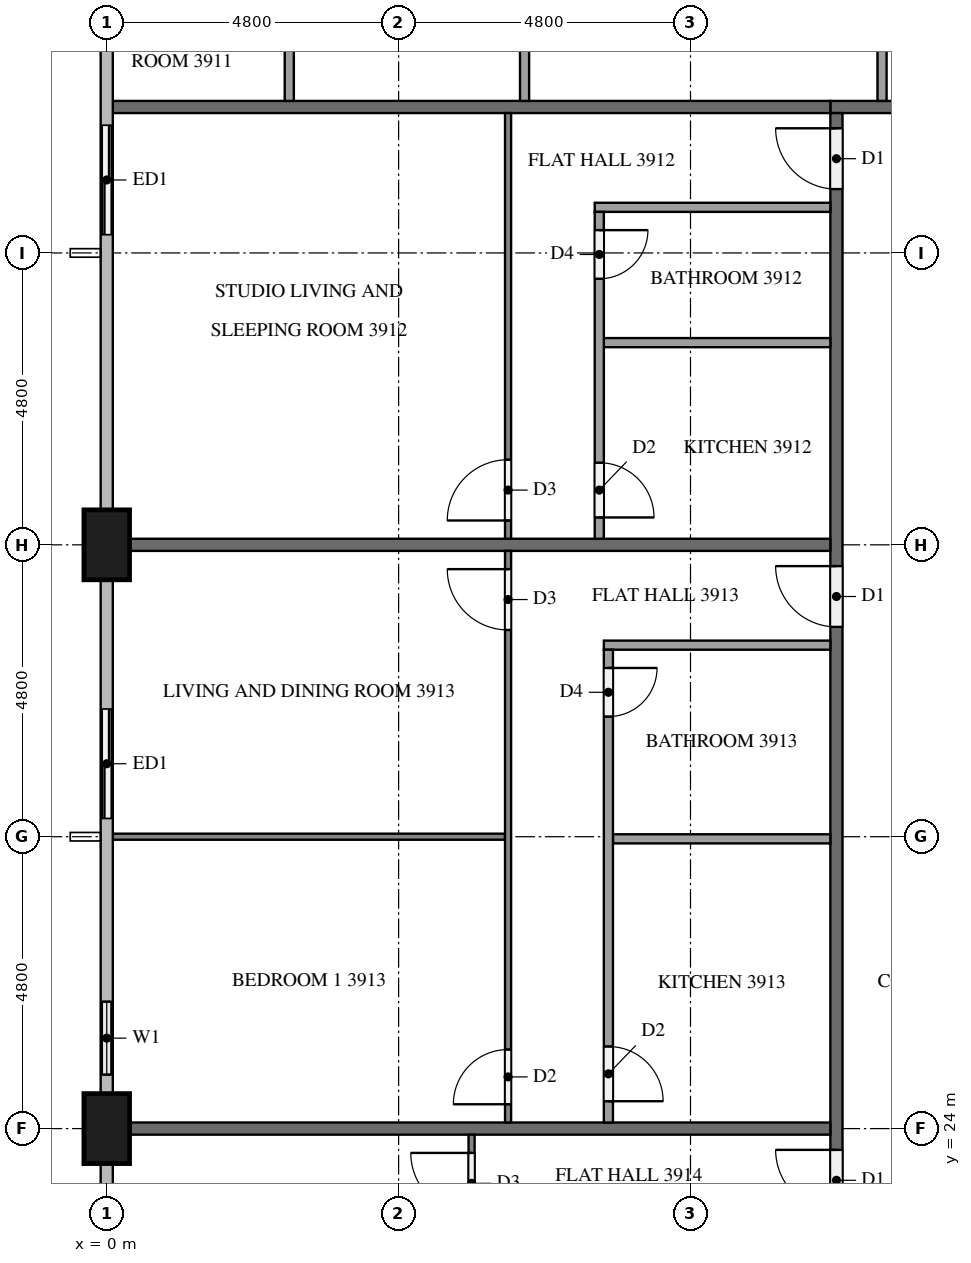
"""IFC4 building model, lengths in metres.
Left out: names, types, materials, properties, quantities, classifications, styles, units other than length and angle.
Written with IfcOpenShell. Run it as: python <this file> out.ifc"""

import sys

from ifc_helpers import new_model, si_unit, direction, frame, frame_2d, origin, origin_2d, place, context, subcontext, project, spatial, rectangle, extrude, element, fill, save


model = new_model("IFC4")
c1 = context("Model", 3, precision=1e-05, world=origin(), true_north=direction((0.0, 1.0)))
c2 = subcontext(c1, "Body", "Model", "MODEL_VIEW")
j1 = project(units=[si_unit("LENGTHUNIT", "METRE"), si_unit("PLANEANGLEUNIT", "RADIAN")], contexts=[c1])
p1 = place(None, origin())
s1 = spatial("IfcSite", under=j1, at=p1, CompositionType="ELEMENT")
p2 = place(p1, origin())
s2 = spatial("IfcBuilding", under=s1, at=p2, CompositionType="ELEMENT")
p3 = place(p2, frame((0.0, 0.0, 152.5)))
s3 = spatial("IfcBuildingStorey", under=s2, at=p3, CompositionType="ELEMENT", Elevation=152.5)
for number, where, z_axis, x_axis in (
    (1, (0.0, 33.6, 0.0), (0.0, 0.0, 1.0), (0.0, 1.0, 0.0)),
    (2, (0.0, 24.0, 0.0), (0.0, 0.0, 1.0), (0.0, 1.0, 0.0)),
):
    element("IfcColumn", number, at=place(p3, frame(where, z_axis=z_axis, x_axis=x_axis)), inside=s3, PredefinedType="COLUMN", context=c2, shape_type="SweptSolid", body=[
        extrude(rectangle(XDim=1.15, YDim=0.75, at=origin_2d()), origin(), (0.0, 0.0, 1.0), 3.2),
    ])
p4 = place(p3, frame((0.0, 40.8, 0.0), z_axis=(0.0, 0.0, 1.0), x_axis=(0.0, -1.0, 0.0)))
e3 = element("IfcWall", 3, at=p4, inside=s3, PredefinedType="SOLIDWALL", context=c2, shape_type="SweptSolid", body=[
    extrude(rectangle(XDim=2.4, YDim=0.15, at=frame_2d((1.2, 0.0))), origin(), (0.0, 0.0, 1.0), 3.2),
])
p5 = place(p4, frame((0.3, 0.0, 0.0)))
e4 = element("IfcOpeningElement", 4, at=p5, cuts=e3, PredefinedType="OPENING", context=c2, shape_type="SweptSolid", body=[
    extrude(rectangle(XDim=1.8, YDim=2.4, at=frame_2d((0.9, 1.2))), frame((0.0, 0.085, 0.0), z_axis=(0.0, -1.0, 0.0), x_axis=(1.0, 0.0, 0.0)), (0.0, 0.0, 1.0), 0.17),
])
p6 = place(p3, frame((0.0, 31.2, 0.0), z_axis=(0.0, 0.0, 1.0), x_axis=(0.0, -1.0, 0.0)))
e5 = element("IfcWall", 5, at=p6, inside=s3, PredefinedType="SOLIDWALL", context=c2, shape_type="SweptSolid", body=[
    extrude(rectangle(XDim=2.4, YDim=0.15, at=frame_2d((1.2, 0.0))), origin(), (0.0, 0.0, 1.0), 3.2),
])
p7 = place(p6, frame((0.3, 0.0, 0.0)))
e6 = element("IfcOpeningElement", 6, at=p7, cuts=e5, PredefinedType="OPENING", context=c2, shape_type="SweptSolid", body=[
    extrude(rectangle(XDim=1.8, YDim=2.4, at=frame_2d((0.9, 1.2))), frame((0.0, 0.085, 0.0), z_axis=(0.0, -1.0, 0.0), x_axis=(1.0, 0.0, 0.0)), (0.0, 0.0, 1.0), 0.17),
])
p8 = place(p3, frame((0.0, 26.4, 0.0), z_axis=(0.0, 0.0, 1.0), x_axis=(0.0, -1.0, 0.0)))
e7 = element("IfcWall", 7, at=p8, inside=s3, PredefinedType="SOLIDWALL", context=c2, shape_type="SweptSolid", body=[
    extrude(rectangle(XDim=1.825, YDim=0.15, at=frame_2d((0.913, 0.0))), origin(), (0.0, 0.0, 1.0), 3.2),
])
p9 = place(p8, frame((0.312, 0.0, 0.9)))
e8 = element("IfcOpeningElement", 8, at=p9, cuts=e7, PredefinedType="OPENING", context=c2, shape_type="SweptSolid", body=[
    extrude(rectangle(XDim=1.2, YDim=1.4, at=frame_2d((0.6, 0.7))), frame((0.0, 0.085, 0.0), z_axis=(0.0, -1.0, 0.0), x_axis=(1.0, 0.0, 0.0)), (0.0, 0.0, 1.0), 0.17),
])
p10 = place(p3, frame((11.9, 40.8, 0.0), z_axis=(0.0, 0.0, 1.0), x_axis=(1.0, 0.0, 0.0)))
e9 = element("IfcWall", 9, at=p10, inside=s3, PredefinedType="PARTITIONING", context=c2, shape_type="SweptSolid", body=[
    extrude(rectangle(XDim=38.6, YDim=0.2, at=frame_2d((19.3, 0.0))), origin(), (0.0, 0.0, 1.0), 3.2),
])
p11 = place(p10, frame((31.65, 0.0, 0.0)))
e10 = element("IfcOpeningElement", 10, at=p11, cuts=e9, PredefinedType="OPENING", context=c2, shape_type="SweptSolid", body=[
    extrude(rectangle(XDim=1.0, YDim=2.1, at=frame_2d((0.5, 1.05))), frame((0.0, 0.11, 0.0), z_axis=(0.0, -1.0, 0.0), x_axis=(1.0, 0.0, 0.0)), (0.0, 0.0, 1.0), 0.22),
])
p12 = place(p10, frame((29.95, 0.0, 0.0)))
e11 = element("IfcOpeningElement", 11, at=p12, cuts=e9, PredefinedType="OPENING", context=c2, shape_type="SweptSolid", body=[
    extrude(rectangle(XDim=1.0, YDim=2.1, at=frame_2d((0.5, 1.05))), frame((0.0, 0.11, 0.0), z_axis=(0.0, -1.0, 0.0), x_axis=(1.0, 0.0, 0.0)), (0.0, 0.0, 1.0), 0.22),
])
p13 = place(p10, frame((15.55, 0.0, 0.0)))
e12 = element("IfcOpeningElement", 12, at=p13, cuts=e9, PredefinedType="OPENING", context=c2, shape_type="SweptSolid", body=[
    extrude(rectangle(XDim=1.0, YDim=2.1, at=frame_2d((0.5, 1.05))), frame((0.0, 0.11, 0.0), z_axis=(0.0, -1.0, 0.0), x_axis=(1.0, 0.0, 0.0)), (0.0, 0.0, 1.0), 0.22),
])
p14 = place(p10, frame((1.15, 0.0, 0.0)))
e13 = element("IfcOpeningElement", 13, at=p14, cuts=e9, PredefinedType="OPENING", context=c2, shape_type="SweptSolid", body=[
    extrude(rectangle(XDim=1.0, YDim=2.1, at=frame_2d((0.5, 1.05))), frame((0.0, 0.11, 0.0), z_axis=(0.0, -1.0, 0.0), x_axis=(1.0, 0.0, 0.0)), (0.0, 0.0, 1.0), 0.22),
])
p15 = place(p3, frame((12.0, 12.1, 0.0), z_axis=(0.0, 0.0, 1.0), x_axis=(0.0, 1.0, 0.0)))
e14 = element("IfcWall", 14, at=p15, inside=s3, PredefinedType="PARTITIONING", context=c2, shape_type="SweptSolid", body=[
    extrude(rectangle(XDim=28.6, YDim=0.2, at=frame_2d((14.3, 0.0))), origin(), (0.0, 0.0, 1.0), 3.2),
])
p16 = place(p15, frame((27.35, 0.0, 0.0)))
e15 = element("IfcOpeningElement", 15, at=p16, cuts=e14, PredefinedType="OPENING", context=c2, shape_type="SweptSolid", body=[
    extrude(rectangle(XDim=1.0, YDim=2.1, at=frame_2d((0.5, 1.05))), frame((0.0, 0.11, 0.0), z_axis=(0.0, -1.0, 0.0), x_axis=(1.0, 0.0, 0.0)), (0.0, 0.0, 1.0), 0.22),
])
p17 = place(p15, frame((20.15, 0.0, 0.0)))
e16 = element("IfcOpeningElement", 16, at=p17, cuts=e14, PredefinedType="OPENING", context=c2, shape_type="SweptSolid", body=[
    extrude(rectangle(XDim=1.0, YDim=2.1, at=frame_2d((0.5, 1.05))), frame((0.0, 0.11, 0.0), z_axis=(0.0, -1.0, 0.0), x_axis=(1.0, 0.0, 0.0)), (0.0, 0.0, 1.0), 0.22),
])
p18 = place(p15, frame((10.55, 0.0, 0.0)))
e17 = element("IfcOpeningElement", 17, at=p18, cuts=e14, PredefinedType="OPENING", context=c2, shape_type="SweptSolid", body=[
    extrude(rectangle(XDim=1.0, YDim=2.1, at=frame_2d((0.5, 1.05))), frame((0.0, 0.11, 0.0), z_axis=(0.0, -1.0, 0.0), x_axis=(1.0, 0.0, 0.0)), (0.0, 0.0, 1.0), 0.22),
])
p19 = place(p3, frame((0.1, 40.8, 0.0), z_axis=(0.0, 0.0, 1.0), x_axis=(1.0, 0.0, 0.0)))
e18 = element("IfcWall", 18, at=p19, inside=s3, PredefinedType="PARTITIONING", context=c2, shape_type="SweptSolid", body=[
    extrude(rectangle(XDim=11.8, YDim=0.2, at=frame_2d((5.9, 0.0))), origin(), (0.0, 0.0, 1.0), 3.2),
])
for number, where, z_axis, x_axis in (
    (19, (0.375, 33.6, 0.0), (0.0, 0.0, 1.0), (1.0, 0.0, 0.0)),
    (20, (0.375, 24.0, 0.0), (0.0, 0.0, 1.0), (1.0, 0.0, 0.0)),
):
    element("IfcWall", number, at=place(p3, frame(where, z_axis=z_axis, x_axis=x_axis)), inside=s3, PredefinedType="PARTITIONING", context=c2, shape_type="SweptSolid", body=[
        extrude(rectangle(XDim=11.525, YDim=0.2, at=frame_2d((5.762, 0.0))), origin(), (0.0, 0.0, 1.0), 3.2),
    ])
for number, where, z_axis, x_axis in (
    (21, (6.871, 40.9, 0.0), (0.0, 0.0, 1.0), (0.0, 1.0, 0.0)),
    (22, (3.002, 40.9, 0.0), (0.0, 0.0, 1.0), (0.0, 1.0, 0.0)),
):
    element("IfcWall", number, at=place(p3, frame(where, z_axis=z_axis, x_axis=x_axis)), inside=s3, PredefinedType="PARTITIONING", context=c2, shape_type="SweptSolid", body=[
        extrude(rectangle(XDim=2.075, YDim=0.15, at=frame_2d((1.038, 0.0))), origin(), (0.0, 0.0, 1.0), 3.2),
    ])
p20 = place(p3, frame((12.75, 40.9, 0.0), z_axis=(0.0, 0.0, 1.0), x_axis=(0.0, 1.0, 0.0)))
e23 = element("IfcWall", 23, at=p20, inside=s3, PredefinedType="PARTITIONING", context=c2, shape_type="SweptSolid", body=[
    extrude(rectangle(XDim=2.225, YDim=0.15, at=frame_2d((1.113, 0.0))), origin(), (0.0, 0.0, 1.0), 3.2),
])
p21 = place(p3, frame((6.6, 33.7, 0.0), z_axis=(0.0, 0.0, 1.0), x_axis=(0.0, 1.0, 0.0)))
e24 = element("IfcWall", 24, at=p21, inside=s3, PredefinedType="PARTITIONING", context=c2, shape_type="SweptSolid", body=[
    extrude(rectangle(XDim=7.0, YDim=0.1, at=frame_2d((3.5, 0.0))), origin(), (0.0, 0.0, 1.0), 3.2),
])
p22 = place(p21, frame((0.3, 0.0, 0.0)))
e25 = element("IfcOpeningElement", 25, at=p22, cuts=e24, PredefinedType="OPENING", context=c2, shape_type="SweptSolid", body=[
    extrude(rectangle(XDim=1.0, YDim=2.1, at=frame_2d((0.5, 1.05))), frame((0.0, 0.06, 0.0), z_axis=(0.0, -1.0, 0.0), x_axis=(1.0, 0.0, 0.0)), (0.0, 0.0, 1.0), 0.12),
])
p23 = place(p3, frame((11.9, 36.925, 0.0), z_axis=(0.0, 0.0, 1.0), x_axis=(-1.0, 0.0, 0.0)))
e26 = element("IfcWall", 26, at=p23, inside=s3, PredefinedType="PARTITIONING", context=c2, shape_type="SweptSolid", body=[
    extrude(rectangle(XDim=3.725, YDim=0.15, at=frame_2d((1.862, 0.0))), origin(), (0.0, 0.0, 1.0), 3.2),
])
p24 = place(p3, frame((11.9, 39.15, 0.0), z_axis=(0.0, 0.0, 1.0), x_axis=(-1.0, 0.0, 0.0)))
e27 = element("IfcWall", 27, at=p24, inside=s3, PredefinedType="PARTITIONING", context=c2, shape_type="SweptSolid", body=[
    extrude(rectangle(XDim=3.875, YDim=0.15, at=frame_2d((1.938, 0.0))), origin(), (0.0, 0.0, 1.0), 3.2),
])
p25 = place(p3, frame((8.1, 39.075, 0.0), z_axis=(0.0, 0.0, 1.0), x_axis=(0.0, -1.0, 0.0)))
e28 = element("IfcWall", 28, at=p25, inside=s3, PredefinedType="PARTITIONING", context=c2, shape_type="SweptSolid", body=[
    extrude(rectangle(XDim=5.375, YDim=0.15, at=frame_2d((2.688, 0.0))), origin(), (0.0, 0.0, 1.0), 3.2),
])
p26 = place(p25, frame((0.3, 0.0, 0.0)))
e29 = element("IfcOpeningElement", 29, at=p26, cuts=e28, PredefinedType="OPENING", context=c2, shape_type="SweptSolid", body=[
    extrude(rectangle(XDim=0.8, YDim=2.1, at=frame_2d((0.4, 1.05))), frame((0.0, 0.085, 0.0), z_axis=(0.0, -1.0, 0.0), x_axis=(1.0, 0.0, 0.0)), (0.0, 0.0, 1.0), 0.17),
])
p27 = place(p25, frame((4.125, 0.0, 0.0)))
e30 = element("IfcOpeningElement", 30, at=p27, cuts=e28, PredefinedType="OPENING", context=c2, shape_type="SweptSolid", body=[
    extrude(rectangle(XDim=0.9, YDim=2.1, at=frame_2d((0.45, 1.05))), frame((0.0, 0.085, 0.0), z_axis=(0.0, -1.0, 0.0), x_axis=(1.0, 0.0, 0.0)), (0.0, 0.0, 1.0), 0.17),
])
p28 = place(p3, frame((6.55, 28.8, 0.0), z_axis=(0.0, 0.0, 1.0), x_axis=(-1.0, 0.0, 0.0)))
e31 = element("IfcWall", 31, at=p28, inside=s3, PredefinedType="PARTITIONING", context=c2, shape_type="SweptSolid", body=[
    extrude(rectangle(XDim=6.45, YDim=0.1, at=frame_2d((3.225, 0.0))), origin(), (0.0, 0.0, 1.0), 3.2),
])
p29 = place(p3, frame((6.6, 24.1, 0.0), z_axis=(0.0, 0.0, 1.0), x_axis=(0.0, 1.0, 0.0)))
e32 = element("IfcWall", 32, at=p29, inside=s3, PredefinedType="PARTITIONING", context=c2, shape_type="SweptSolid", body=[
    extrude(rectangle(XDim=9.4, YDim=0.1, at=frame_2d((4.7, 0.0))), origin(), (0.0, 0.0, 1.0), 3.2),
])
p30 = place(p29, frame((8.1, 0.0, 0.0)))
e33 = element("IfcOpeningElement", 33, at=p30, cuts=e32, PredefinedType="OPENING", context=c2, shape_type="SweptSolid", body=[
    extrude(rectangle(XDim=1.0, YDim=2.1, at=frame_2d((0.5, 1.05))), frame((0.0, 0.06, 0.0), z_axis=(0.0, -1.0, 0.0), x_axis=(1.0, 0.0, 0.0)), (0.0, 0.0, 1.0), 0.12),
])
p31 = place(p29, frame((0.3, 0.0, 0.0)))
e34 = element("IfcOpeningElement", 34, at=p31, cuts=e32, PredefinedType="OPENING", context=c2, shape_type="SweptSolid", body=[
    extrude(rectangle(XDim=0.9, YDim=2.1, at=frame_2d((0.45, 1.05))), frame((0.0, 0.06, 0.0), z_axis=(0.0, -1.0, 0.0), x_axis=(1.0, 0.0, 0.0)), (0.0, 0.0, 1.0), 0.12),
])
p32 = place(p3, frame((11.9, 28.765, 0.0), z_axis=(0.0, 0.0, 1.0), x_axis=(-1.0, 0.0, 0.0)))
e35 = element("IfcWall", 35, at=p32, inside=s3, PredefinedType="PARTITIONING", context=c2, shape_type="SweptSolid", body=[
    extrude(rectangle(XDim=3.575, YDim=0.15, at=frame_2d((1.788, 0.0))), origin(), (0.0, 0.0, 1.0), 3.2),
])
p33 = place(p3, frame((11.9, 31.95, 0.0), z_axis=(0.0, 0.0, 1.0), x_axis=(-1.0, 0.0, 0.0)))
e36 = element("IfcWall", 36, at=p33, inside=s3, PredefinedType="PARTITIONING", context=c2, shape_type="SweptSolid", body=[
    extrude(rectangle(XDim=3.725, YDim=0.15, at=frame_2d((1.862, 0.0))), origin(), (0.0, 0.0, 1.0), 3.2),
])
p34 = place(p3, frame((8.25, 31.875, 0.0), z_axis=(0.0, 0.0, 1.0), x_axis=(0.0, -1.0, 0.0)))
e37 = element("IfcWall", 37, at=p34, inside=s3, PredefinedType="PARTITIONING", context=c2, shape_type="SweptSolid", body=[
    extrude(rectangle(XDim=7.775, YDim=0.15, at=frame_2d((3.887, 0.0))), origin(), (0.0, 0.0, 1.0), 3.2),
])
p35 = place(p34, frame((0.3, 0.0, 0.0)))
e38 = element("IfcOpeningElement", 38, at=p35, cuts=e37, PredefinedType="OPENING", context=c2, shape_type="SweptSolid", body=[
    extrude(rectangle(XDim=0.8, YDim=2.1, at=frame_2d((0.4, 1.05))), frame((0.0, 0.085, 0.0), z_axis=(0.0, -1.0, 0.0), x_axis=(1.0, 0.0, 0.0)), (0.0, 0.0, 1.0), 0.17),
])
p36 = place(p34, frame((6.525, 0.0, 0.0)))
e39 = element("IfcOpeningElement", 39, at=p36, cuts=e37, PredefinedType="OPENING", context=c2, shape_type="SweptSolid", body=[
    extrude(rectangle(XDim=0.9, YDim=2.1, at=frame_2d((0.45, 1.05))), frame((0.0, 0.085, 0.0), z_axis=(0.0, -1.0, 0.0), x_axis=(1.0, 0.0, 0.0)), (0.0, 0.0, 1.0), 0.17),
])
p37 = place(p3, frame((6.0, 12.1, 0.0), z_axis=(0.0, 0.0, 1.0), x_axis=(0.0, 1.0, 0.0)))
e40 = element("IfcWall", 40, at=p37, inside=s3, PredefinedType="PARTITIONING", context=c2, shape_type="SweptSolid", body=[
    extrude(rectangle(XDim=11.8, YDim=0.1, at=frame_2d((5.9, 0.0))), origin(), (0.0, 0.0, 1.0), 3.2),
])
p38 = place(p37, frame((10.5, 0.0, 0.0)))
e41 = element("IfcOpeningElement", 41, at=p38, cuts=e40, PredefinedType="OPENING", context=c2, shape_type="SweptSolid", body=[
    extrude(rectangle(XDim=1.0, YDim=2.1, at=frame_2d((0.5, 1.05))), frame((0.0, 0.06, 0.0), z_axis=(0.0, -1.0, 0.0), x_axis=(1.0, 0.0, 0.0)), (0.0, 0.0, 1.0), 0.12),
])
p39 = place(p37, frame((0.3, 0.0, 0.0)))
e42 = element("IfcOpeningElement", 42, at=p39, cuts=e40, PredefinedType="OPENING", context=c2, shape_type="SweptSolid", body=[
    extrude(rectangle(XDim=0.9, YDim=2.1, at=frame_2d((0.45, 1.05))), frame((0.0, 0.06, 0.0), z_axis=(0.0, -1.0, 0.0), x_axis=(1.0, 0.0, 0.0)), (0.0, 0.0, 1.0), 0.12),
])
p40 = place(p5, origin())
e43 = element("IfcDoor", 43, at=p40, inside=s3, OperationType="SLIDING_TO_LEFT", PredefinedType="DOOR", context=c2, shape_type="SweptSolid", body=[
    extrude(rectangle(XDim=1.8, YDim=2.4, at=frame_2d((0.9, 1.2))), frame((0.0, 0.025, 0.0), z_axis=(0.0, -1.0, 0.0), x_axis=(1.0, 0.0, 0.0)), (0.0, 0.0, 1.0), 0.05),
])
fill(e4, e43)
p41 = place(p7, origin())
e44 = element("IfcDoor", 44, at=p41, inside=s3, OperationType="SLIDING_TO_RIGHT", PredefinedType="DOOR", context=c2, shape_type="SweptSolid", body=[
    extrude(rectangle(XDim=1.8, YDim=2.4, at=frame_2d((0.9, 1.2))), frame((0.0, 0.025, 0.0), z_axis=(0.0, -1.0, 0.0), x_axis=(1.0, 0.0, 0.0)), (0.0, 0.0, 1.0), 0.05),
])
fill(e6, e44)
p42 = place(p9, origin())
e45 = element("IfcWindow", 45, at=p42, inside=s3, PartitioningType="SINGLE_PANEL", PredefinedType="WINDOW", context=c2, shape_type="SweptSolid", body=[
    extrude(rectangle(XDim=1.2, YDim=1.4, at=frame_2d((0.6, 0.7))), frame((0.0, 0.03, 0.0), z_axis=(0.0, -1.0, 0.0), x_axis=(1.0, 0.0, 0.0)), (0.0, 0.0, 1.0), 0.06),
])
fill(e8, e45)
p43 = place(p16, origin())
e46 = element("IfcDoor", 46, at=p43, inside=s3, OperationType="SINGLE_SWING_RIGHT", PredefinedType="DOOR", context=c2, shape_type="SweptSolid", body=[
    extrude(rectangle(XDim=1.0, YDim=2.1, at=frame_2d((0.5, 1.05))), frame((0.0, 0.025, 0.0), z_axis=(0.0, -1.0, 0.0), x_axis=(1.0, 0.0, 0.0)), (0.0, 0.0, 1.0), 0.05),
])
fill(e15, e46)
p44 = place(p17, origin())
e47 = element("IfcDoor", 47, at=p44, inside=s3, OperationType="SINGLE_SWING_RIGHT", PredefinedType="DOOR", context=c2, shape_type="SweptSolid", body=[
    extrude(rectangle(XDim=1.0, YDim=2.1, at=frame_2d((0.5, 1.05))), frame((0.0, 0.025, 0.0), z_axis=(0.0, -1.0, 0.0), x_axis=(1.0, 0.0, 0.0)), (0.0, 0.0, 1.0), 0.05),
])
fill(e16, e47)
p45 = place(p18, origin())
e48 = element("IfcDoor", 48, at=p45, inside=s3, OperationType="SINGLE_SWING_RIGHT", PredefinedType="DOOR", context=c2, shape_type="SweptSolid", body=[
    extrude(rectangle(XDim=1.0, YDim=2.1, at=frame_2d((0.5, 1.05))), frame((0.0, 0.025, 0.0), z_axis=(0.0, -1.0, 0.0), x_axis=(1.0, 0.0, 0.0)), (0.0, 0.0, 1.0), 0.05),
])
fill(e17, e48)
p46 = place(p22, origin())
e49 = element("IfcDoor", 49, at=p46, inside=s3, OperationType="SINGLE_SWING_LEFT", PredefinedType="DOOR", context=c2, shape_type="SweptSolid", body=[
    extrude(rectangle(XDim=1.0, YDim=2.1, at=frame_2d((0.5, 1.05))), frame((0.0, 0.025, 0.0), z_axis=(0.0, -1.0, 0.0), x_axis=(1.0, 0.0, 0.0)), (0.0, 0.0, 1.0), 0.05),
])
fill(e25, e49)
p47 = place(p26, origin())
e50 = element("IfcDoor", 50, at=p47, inside=s3, OperationType="SINGLE_SWING_LEFT", PredefinedType="DOOR", context=c2, shape_type="SweptSolid", body=[
    extrude(rectangle(XDim=0.8, YDim=2.1, at=frame_2d((0.4, 1.05))), frame((0.0, 0.025, 0.0), z_axis=(0.0, -1.0, 0.0), x_axis=(1.0, 0.0, 0.0)), (0.0, 0.0, 1.0), 0.05),
])
fill(e29, e50)
p48 = place(p27, origin())
e51 = element("IfcDoor", 51, at=p48, inside=s3, OperationType="SINGLE_SWING_RIGHT", PredefinedType="DOOR", context=c2, shape_type="SweptSolid", body=[
    extrude(rectangle(XDim=0.9, YDim=2.1, at=frame_2d((0.45, 1.05))), frame((0.0, 0.025, 0.0), z_axis=(0.0, -1.0, 0.0), x_axis=(1.0, 0.0, 0.0)), (0.0, 0.0, 1.0), 0.05),
])
fill(e30, e51)
p49 = place(p30, origin())
e52 = element("IfcDoor", 52, at=p49, inside=s3, OperationType="SINGLE_SWING_RIGHT", PredefinedType="DOOR", context=c2, shape_type="SweptSolid", body=[
    extrude(rectangle(XDim=1.0, YDim=2.1, at=frame_2d((0.5, 1.05))), frame((0.0, 0.025, 0.0), z_axis=(0.0, -1.0, 0.0), x_axis=(1.0, 0.0, 0.0)), (0.0, 0.0, 1.0), 0.05),
])
fill(e33, e52)
p50 = place(p31, origin())
e53 = element("IfcDoor", 53, at=p50, inside=s3, OperationType="SINGLE_SWING_LEFT", PredefinedType="DOOR", context=c2, shape_type="SweptSolid", body=[
    extrude(rectangle(XDim=0.9, YDim=2.1, at=frame_2d((0.45, 1.05))), frame((0.0, 0.025, 0.0), z_axis=(0.0, -1.0, 0.0), x_axis=(1.0, 0.0, 0.0)), (0.0, 0.0, 1.0), 0.05),
])
fill(e34, e53)
p51 = place(p35, origin())
e54 = element("IfcDoor", 54, at=p51, inside=s3, OperationType="SINGLE_SWING_LEFT", PredefinedType="DOOR", context=c2, shape_type="SweptSolid", body=[
    extrude(rectangle(XDim=0.8, YDim=2.1, at=frame_2d((0.4, 1.05))), frame((0.0, 0.025, 0.0), z_axis=(0.0, -1.0, 0.0), x_axis=(1.0, 0.0, 0.0)), (0.0, 0.0, 1.0), 0.05),
])
fill(e38, e54)
p52 = place(p36, origin())
e55 = element("IfcDoor", 55, at=p52, inside=s3, OperationType="SINGLE_SWING_RIGHT", PredefinedType="DOOR", context=c2, shape_type="SweptSolid", body=[
    extrude(rectangle(XDim=0.9, YDim=2.1, at=frame_2d((0.45, 1.05))), frame((0.0, 0.025, 0.0), z_axis=(0.0, -1.0, 0.0), x_axis=(1.0, 0.0, 0.0)), (0.0, 0.0, 1.0), 0.05),
])
fill(e39, e55)
p53 = place(p38, origin())
e56 = element("IfcDoor", 56, at=p53, inside=s3, OperationType="SINGLE_SWING_RIGHT", PredefinedType="DOOR", context=c2, shape_type="SweptSolid", body=[
    extrude(rectangle(XDim=1.0, YDim=2.1, at=frame_2d((0.5, 1.05))), frame((0.0, 0.025, 0.0), z_axis=(0.0, -1.0, 0.0), x_axis=(1.0, 0.0, 0.0)), (0.0, 0.0, 1.0), 0.05),
])
fill(e41, e56)
save(model, sys.argv[1])
